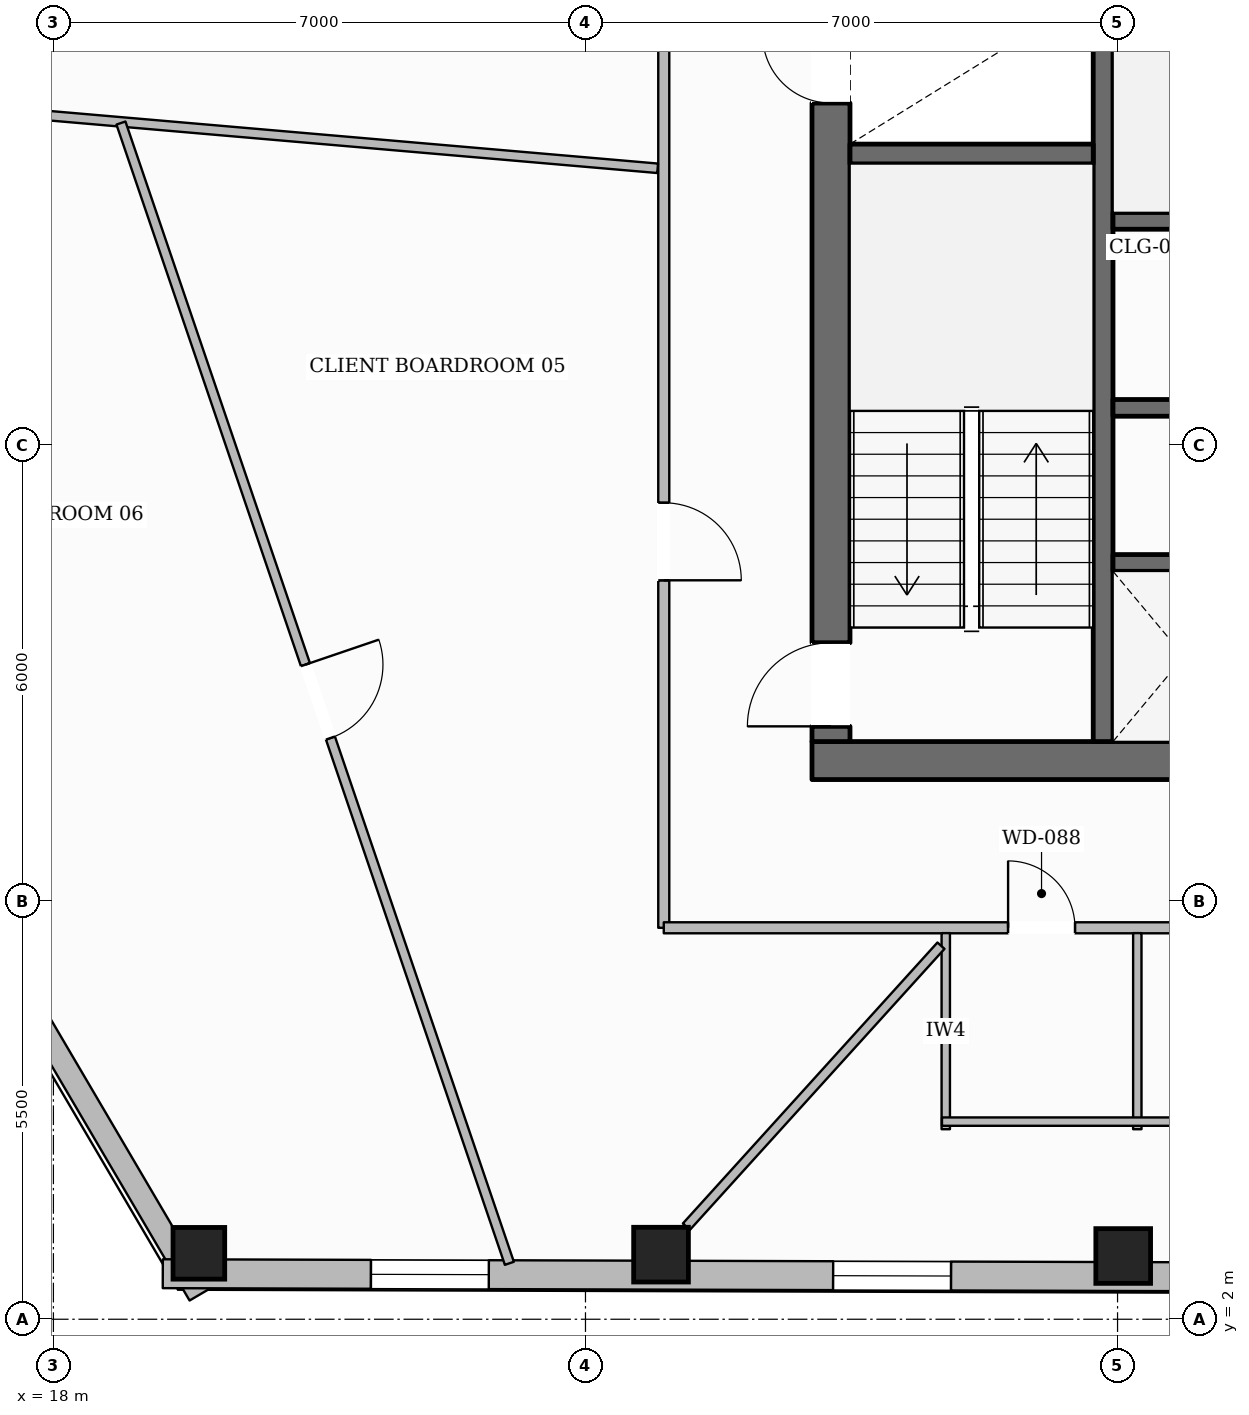
"""IFC4 building model, lengths in metres.
Left out: names, types, materials, properties, quantities, classifications, styles, units other than length and angle.
Written with IfcOpenShell. Run it as: python <this file> out.ifc"""

import sys

from ifc_helpers import new_model, si_unit, direction, frame, frame_2d, origin, origin_2d, place, context, subcontext, project, spatial, rectangle, hollow_rectangle, extrude, element, fill, save


model = new_model("IFC4")
c1 = context("Model", 3, precision=1e-05, world=origin(), true_north=direction((0.0, 1.0)))
c2 = subcontext(c1, "Body", "Model", "MODEL_VIEW")
j1 = project(units=[si_unit("LENGTHUNIT", "METRE"), si_unit("PLANEANGLEUNIT", "RADIAN")], contexts=[c1])
p1 = place(None, origin())
s1 = spatial("IfcSite", under=j1, at=p1, CompositionType="ELEMENT")
p2 = place(p1, origin())
s2 = spatial("IfcBuilding", under=s1, at=p2, CompositionType="ELEMENT")
p3 = place(p2, frame((0.0, 0.0, 127.85)))
s3 = spatial("IfcBuildingStorey", under=s2, at=p3, CompositionType="ELEMENT", Elevation=127.85)
p4 = place(p3, frame((27.98, 9.35, 0.0), z_axis=(0.0, 0.0, 1.0), x_axis=(1.0, 0.0, 0.0)))
e1 = element("IfcWall", 1, at=p4, inside=s3, PredefinedType="SOLIDWALL", context=c2, shape_type="SweptSolid", body=[
    extrude(rectangle(XDim=20.04, YDim=0.5, at=frame_2d((10.02, 0.0))), origin(), (0.0, 0.0, 1.0), 3.6),
])
p5 = place(p4, frame((10.52, 0.0, 0.0)))
e2 = element("IfcOpeningElement", 2, at=p5, cuts=e1, PredefinedType="OPENING", context=c2, shape_type="SweptSolid", body=[
    extrude(rectangle(XDim=1.4, YDim=2.2, at=frame_2d((0.7, 1.1))), frame((0.0, 0.26, 0.0), z_axis=(0.0, -1.0, 0.0), x_axis=(1.0, 0.0, 0.0)), (0.0, 0.0, 1.0), 0.52),
])
p6 = place(p3, frame((28.23, 9.6, 0.0), z_axis=(0.0, 0.0, 1.0), x_axis=(0.0, 1.0, 0.0)))
e3 = element("IfcWall", 3, at=p6, inside=s3, PredefinedType="SOLIDWALL", context=c2, shape_type="SweptSolid", body=[
    extrude(rectangle(XDim=13.0, YDim=0.5, at=frame_2d((6.5, 0.0))), origin(), (0.0, 0.0, 1.0), 3.6),
])
p7 = place(p6, frame((0.2, 0.0, 0.0)))
e4 = element("IfcOpeningElement", 4, at=p7, cuts=e3, PredefinedType="OPENING", context=c2, shape_type="SweptSolid", body=[
    extrude(rectangle(XDim=1.1, YDim=2.15, at=frame_2d((0.55, 1.075))), frame((0.0, 0.26, 0.0), z_axis=(0.0, -1.0, 0.0), x_axis=(1.0, 0.0, 0.0)), (0.0, 0.0, 1.0), 0.52),
])
p8 = place(p6, frame((8.4, 0.0, 0.0)))
e5 = element("IfcOpeningElement", 5, at=p8, cuts=e3, PredefinedType="OPENING", context=c2, shape_type="SweptSolid", body=[
    extrude(rectangle(XDim=0.9, YDim=2.1, at=frame_2d((0.45, 1.05))), frame((0.0, 0.26, 0.0), z_axis=(0.0, -1.0, 0.0), x_axis=(1.0, 0.0, 0.0)), (0.0, 0.0, 1.0), 0.52),
])
p9 = place(p3, frame((31.81, 9.6, 0.0), z_axis=(0.0, 0.0, 1.0), x_axis=(0.0, 1.0, 0.0)))
e6 = element("IfcWall", 6, at=p9, inside=s3, PredefinedType="SHEAR", context=c2, shape_type="SweptSolid", body=[
    extrude(rectangle(XDim=13.0, YDim=0.26, at=frame_2d((6.5, 0.0))), origin(), (0.0, 0.0, 1.0), 3.6),
])
p10 = place(p9, frame((10.925, 0.0, 0.0)))
e7 = element("IfcOpeningElement", 7, at=p10, cuts=e6, PredefinedType="OPENING", context=c2, shape_type="SweptSolid", body=[
    extrude(rectangle(XDim=1.25, YDim=2.25, at=frame_2d((0.625, 1.125))), frame((0.0, 0.14, 0.0), z_axis=(0.0, -1.0, 0.0), x_axis=(1.0, 0.0, 0.0)), (0.0, 0.0, 1.0), 0.28),
])
p11 = place(p3, frame((28.48, 17.33, 0.0), z_axis=(0.0, 0.0, 1.0), x_axis=(1.0, 0.0, 0.0)))
e8 = element("IfcWall", 8, at=p11, inside=s3, PredefinedType="SHEAR", context=c2, shape_type="SweptSolid", body=[
    extrude(rectangle(XDim=3.2, YDim=0.26, at=frame_2d((1.6, 0.0))), origin(), (0.0, 0.0, 1.0), 3.6),
])
p12 = place(p3, frame((31.94, 16.45, 0.0), z_axis=(0.0, 0.0, 1.0), x_axis=(1.0, 0.0, 0.0)))
e9 = element("IfcWall", 9, at=p12, inside=s3, PredefinedType="SOLIDWALL", context=c2, shape_type="SweptSolid", body=[
    extrude(rectangle(XDim=12.12, YDim=0.22, at=frame_2d((6.06, 0.0))), origin(), (0.0, 0.0, 1.0), 3.6),
])
p13 = place(p3, frame((31.94, 13.99, 0.0), z_axis=(0.0, 0.0, 1.0), x_axis=(1.0, 0.0, 0.0)))
e10 = element("IfcWall", 10, at=p13, inside=s3, PredefinedType="SOLIDWALL", context=c2, shape_type="SweptSolid", body=[
    extrude(rectangle(XDim=12.12, YDim=0.22, at=frame_2d((6.06, 0.0))), origin(), (0.0, 0.0, 1.0), 3.6),
])
p14 = place(p13, frame((2.51, 0.0, 0.0)))
e11 = element("IfcOpeningElement", 11, at=p14, cuts=e10, PredefinedType="OPENING", context=c2, shape_type="SweptSolid", body=[
    extrude(rectangle(XDim=0.9, YDim=2.1, at=frame_2d((0.45, 1.05))), frame((0.0, 0.12, 0.0), z_axis=(0.0, -1.0, 0.0), x_axis=(1.0, 0.0, 0.0)), (0.0, 0.0, 1.0), 0.24),
])
p15 = place(p13, frame((6.535, 0.0, 0.0)))
e12 = element("IfcOpeningElement", 12, at=p15, cuts=e10, PredefinedType="OPENING", context=c2, shape_type="SweptSolid", body=[
    extrude(rectangle(XDim=1.1, YDim=2.2, at=frame_2d((0.55, 1.1))), frame((0.0, 0.12, 0.0), z_axis=(0.0, -1.0, 0.0), x_axis=(1.0, 0.0, 0.0)), (0.0, 0.0, 1.0), 0.24),
])
p16 = place(p13, frame((8.585, 0.0, 0.0)))
e13 = element("IfcOpeningElement", 13, at=p16, cuts=e10, PredefinedType="OPENING", context=c2, shape_type="SweptSolid", body=[
    extrude(rectangle(XDim=1.1, YDim=2.2, at=frame_2d((0.55, 1.1))), frame((0.0, 0.12, 0.0), z_axis=(0.0, -1.0, 0.0), x_axis=(1.0, 0.0, 0.0)), (0.0, 0.0, 1.0), 0.24),
])
p17 = place(p13, frame((10.635, 0.0, 0.0)))
e14 = element("IfcOpeningElement", 14, at=p17, cuts=e10, PredefinedType="OPENING", context=c2, shape_type="SweptSolid", body=[
    extrude(rectangle(XDim=1.1, YDim=2.2, at=frame_2d((0.55, 1.1))), frame((0.0, 0.12, 0.0), z_axis=(0.0, -1.0, 0.0), x_axis=(1.0, 0.0, 0.0)), (0.0, 0.0, 1.0), 0.24),
])
p18 = place(p3, frame((31.94, 11.95, 0.0), z_axis=(0.0, 0.0, 1.0), x_axis=(1.0, 0.0, 0.0)))
e15 = element("IfcWall", 15, at=p18, inside=s3, PredefinedType="SOLIDWALL", context=c2, shape_type="SweptSolid", body=[
    extrude(rectangle(XDim=6.19, YDim=0.22, at=frame_2d((3.095, 0.0))), origin(), (0.0, 0.0, 1.0), 3.6),
])
p19 = place(p3, frame((19.914, 2.868, 0.0), z_axis=(0.0, 0.0, 1.0), x_axis=(1.0, 0.0, 0.0)))
e16 = element("IfcColumn", 16, at=p19, inside=s3, PredefinedType="COLUMN", context=c2, shape_type="SweptSolid", body=[
    extrude(hollow_rectangle(XDim=0.68, YDim=0.68, WallThickness=0.03, at=origin_2d()), origin(), (0.0, 0.0, 1.0), 3.6),
])
for number, where, z_axis, x_axis in (
    (17, (25.994, 2.85, 0.0), (0.0, 0.0, 1.0), (1.0, 0.0, 0.0)),
    (18, (32.074, 2.832, 0.0), (0.0, 0.0, 1.0), (1.0, 0.0, 0.0)),
):
    element("IfcColumn", number, at=place(p3, frame(where, z_axis=z_axis, x_axis=x_axis)), inside=s3, PredefinedType="COLUMN", context=c2, shape_type="SweptSolid", body=[
        extrude(hollow_rectangle(XDim=0.72, YDim=0.72, WallThickness=0.032, at=origin_2d()), origin(), (0.0, 0.0, 1.0), 3.6),
    ])
p20 = place(p3, frame((13.648, 12.443, 0.0), z_axis=(0.0, 0.0, 1.0), x_axis=(0.504070270963, 0.863662643589, 0.0)))
e19 = element("IfcWall", 19, at=p20, inside=s3, PredefinedType="STANDARD", context=c2, shape_type="SweptSolid", body=[
    extrude(rectangle(XDim=36.948, YDim=0.38, at=frame_2d((18.474, 0.0))), origin(), (0.0, 0.0, 1.0), 3.059),
])
p21 = place(p20, frame((27.111, 0.0, 0.0)))
e20 = element("IfcOpeningElement", 20, at=p21, cuts=e19, PredefinedType="OPENING", context=c2, shape_type="SweptSolid", body=[
    extrude(rectangle(XDim=1.0, YDim=2.2, at=frame_2d((0.5, 1.1))), frame((0.0, 0.2, 0.0), z_axis=(0.0, -1.0, 0.0), x_axis=(1.0, 0.0, 0.0)), (0.0, 0.0, 1.0), 0.4),
])
p22 = place(p20, frame((32.697, 0.0, 0.65)))
e21 = element("IfcOpeningElement", 21, at=p22, cuts=e19, PredefinedType="OPENING", context=c2, shape_type="SweptSolid", body=[
    extrude(rectangle(XDim=1.55, YDim=1.75, at=frame_2d((0.775, 0.875))), frame((0.0, 0.2, 0.0), z_axis=(0.0, -1.0, 0.0), x_axis=(1.0, 0.0, 0.0)), (0.0, 0.0, 1.0), 0.4),
])
p23 = place(p20, frame((20.7, 0.0, 0.65)))
e22 = element("IfcOpeningElement", 22, at=p23, cuts=e19, PredefinedType="OPENING", context=c2, shape_type="SweptSolid", body=[
    extrude(rectangle(XDim=1.55, YDim=1.75, at=frame_2d((0.775, 0.875))), frame((0.0, 0.2, 0.0), z_axis=(0.0, -1.0, 0.0), x_axis=(1.0, 0.0, 0.0)), (0.0, 0.0, 1.0), 0.4),
])
p24 = place(p20, frame((8.704, 0.0, 0.65)))
e23 = element("IfcOpeningElement", 23, at=p24, cuts=e19, PredefinedType="OPENING", context=c2, shape_type="SweptSolid", body=[
    extrude(rectangle(XDim=1.55, YDim=1.75, at=frame_2d((0.775, 0.875))), frame((0.0, 0.2, 0.0), z_axis=(0.0, -1.0, 0.0), x_axis=(1.0, 0.0, 0.0)), (0.0, 0.0, 1.0), 0.4),
])
p25 = place(p20, frame((2.705, 0.0, 0.65)))
e24 = element("IfcOpeningElement", 24, at=p25, cuts=e19, PredefinedType="OPENING", context=c2, shape_type="SweptSolid", body=[
    extrude(rectangle(XDim=1.55, YDim=1.75, at=frame_2d((0.775, 0.875))), frame((0.0, 0.2, 0.0), z_axis=(0.0, -1.0, 0.0), x_axis=(1.0, 0.0, 0.0)), (0.0, 0.0, 1.0), 0.4),
])
p26 = place(p3, frame((19.921, 2.322, 0.0), z_axis=(0.0, 0.0, 1.0), x_axis=(-0.506600522331, 0.86218090374, 0.0)))
e25 = element("IfcWall", 25, at=p26, inside=s3, PredefinedType="STANDARD", context=c2, shape_type="SweptSolid", body=[
    extrude(rectangle(XDim=12.385, YDim=0.3, at=frame_2d((6.192, 0.0))), origin(), (0.0, 0.0, 1.0), 3.059),
])
p27 = place(p26, frame((5.592, 0.0, 0.65)))
e26 = element("IfcOpeningElement", 26, at=p27, cuts=e25, PredefinedType="OPENING", context=c2, shape_type="SweptSolid", body=[
    extrude(rectangle(XDim=1.2, YDim=1.7, at=frame_2d((0.6, 0.85))), frame((0.0, 0.16, 0.0), z_axis=(0.0, -1.0, 0.0), x_axis=(1.0, 0.0, 0.0)), (0.0, 0.0, 1.0), 0.32),
])
p28 = place(p3, frame((56.872, 2.49, 0.0), z_axis=(0.0, 0.0, 1.0), x_axis=(-0.999995712094, 0.002928445665, 0.0)))
e27 = element("IfcWall", 27, at=p28, inside=s3, PredefinedType="STANDARD", context=c2, shape_type="SweptSolid", body=[
    extrude(rectangle(XDim=37.433, YDim=0.38, at=frame_2d((18.716, 0.0))), origin(), (0.0, 0.0, 1.0), 3.059),
])
p29 = place(p28, frame((33.144, 0.0, 0.65)))
e28 = element("IfcOpeningElement", 28, at=p29, cuts=e27, PredefinedType="OPENING", context=c2, shape_type="SweptSolid", body=[
    extrude(rectangle(XDim=1.55, YDim=1.75, at=frame_2d((0.775, 0.875))), frame((0.0, 0.2, 0.0), z_axis=(0.0, -1.0, 0.0), x_axis=(1.0, 0.0, 0.0)), (0.0, 0.0, 1.0), 0.4),
])
p30 = place(p28, frame((27.063, 0.0, 0.65)))
e29 = element("IfcOpeningElement", 29, at=p30, cuts=e27, PredefinedType="OPENING", context=c2, shape_type="SweptSolid", body=[
    extrude(rectangle(XDim=1.55, YDim=1.75, at=frame_2d((0.775, 0.875))), frame((0.0, 0.2, 0.0), z_axis=(0.0, -1.0, 0.0), x_axis=(1.0, 0.0, 0.0)), (0.0, 0.0, 1.0), 0.4),
])
p31 = place(p28, frame((20.983, 0.0, 0.65)))
e30 = element("IfcOpeningElement", 30, at=p31, cuts=e27, PredefinedType="OPENING", context=c2, shape_type="SweptSolid", body=[
    extrude(rectangle(XDim=1.55, YDim=1.75, at=frame_2d((0.775, 0.875))), frame((0.0, 0.2, 0.0), z_axis=(0.0, -1.0, 0.0), x_axis=(1.0, 0.0, 0.0)), (0.0, 0.0, 1.0), 0.4),
])
p32 = place(p28, frame((8.822, 0.0, 0.65)))
e31 = element("IfcOpeningElement", 31, at=p32, cuts=e27, PredefinedType="OPENING", context=c2, shape_type="SweptSolid", body=[
    extrude(rectangle(XDim=1.55, YDim=1.75, at=frame_2d((0.775, 0.875))), frame((0.0, 0.2, 0.0), z_axis=(0.0, -1.0, 0.0), x_axis=(1.0, 0.0, 0.0)), (0.0, 0.0, 1.0), 0.4),
])
p33 = place(p28, frame((2.742, 0.0, 0.65)))
e32 = element("IfcOpeningElement", 32, at=p33, cuts=e27, PredefinedType="OPENING", context=c2, shape_type="SweptSolid", body=[
    extrude(rectangle(XDim=1.55, YDim=1.75, at=frame_2d((0.775, 0.875))), frame((0.0, 0.2, 0.0), z_axis=(0.0, -1.0, 0.0), x_axis=(1.0, 0.0, 0.0)), (0.0, 0.0, 1.0), 0.4),
])
p34 = place(p3, frame((26.03, 25.05, 0.0), z_axis=(0.0, 0.0, 1.0), x_axis=(0.0, -1.0, 0.0)))
e33 = element("IfcWall", 33, at=p34, inside=s3, PredefinedType="PARTITIONING", context=c2, shape_type="SweptSolid", body=[
    extrude(rectangle(XDim=17.9, YDim=0.145, at=frame_2d((8.95, 0.0))), origin(), (0.0, 0.0, 1.0), 3.288),
])
p35 = place(p34, frame((3.53, 0.0, 0.0)))
e34 = element("IfcOpeningElement", 34, at=p35, cuts=e33, PredefinedType="OPENING", context=c2, shape_type="SweptSolid", body=[
    extrude(rectangle(XDim=1.02, YDim=2.15, at=frame_2d((0.51, 1.075))), frame((0.0, 0.083, 0.0), z_axis=(0.0, -1.0, 0.0), x_axis=(1.0, 0.0, 0.0)), (0.0, 0.0, 1.0), 0.165),
])
p36 = place(p34, frame((12.309, 0.0, 0.0)))
e35 = element("IfcOpeningElement", 35, at=p36, cuts=e33, PredefinedType="OPENING", context=c2, shape_type="SweptSolid", body=[
    extrude(rectangle(XDim=1.02, YDim=2.15, at=frame_2d((0.51, 1.075))), frame((0.0, 0.083, 0.0), z_axis=(0.0, -1.0, 0.0), x_axis=(1.0, 0.0, 0.0)), (0.0, 0.0, 1.0), 0.165),
])
p37 = place(p3, frame((26.03, 7.15, 0.0), z_axis=(0.0, 0.0, 1.0), x_axis=(1.0, 0.0, 0.0)))
e36 = element("IfcWall", 36, at=p37, inside=s3, PredefinedType="PARTITIONING", context=c2, shape_type="SweptSolid", body=[
    extrude(rectangle(XDim=23.94, YDim=0.145, at=frame_2d((11.97, 0.0))), origin(), (0.0, 0.0, 1.0), 3.6),
])
p38 = place(p37, frame((4.53, 0.0, 0.0)))
e37 = element("IfcOpeningElement", 37, at=p38, cuts=e36, PredefinedType="OPENING", context=c2, shape_type="SweptSolid", body=[
    extrude(rectangle(XDim=0.88, YDim=2.1, at=frame_2d((0.44, 1.05))), frame((0.0, 0.083, 0.0), z_axis=(0.0, -1.0, 0.0), x_axis=(1.0, 0.0, 0.0)), (0.0, 0.0, 1.0), 0.165),
])
p39 = place(p37, frame((7.05, 0.0, 0.0)))
e38 = element("IfcOpeningElement", 38, at=p39, cuts=e36, PredefinedType="OPENING", context=c2, shape_type="SweptSolid", body=[
    extrude(rectangle(XDim=0.88, YDim=2.1, at=frame_2d((0.44, 1.05))), frame((0.0, 0.083, 0.0), z_axis=(0.0, -1.0, 0.0), x_axis=(1.0, 0.0, 0.0)), (0.0, 0.0, 1.0), 0.165),
])
p40 = place(p37, frame((9.43, 0.0, 0.0)))
e39 = element("IfcOpeningElement", 39, at=p40, cuts=e36, PredefinedType="OPENING", context=c2, shape_type="SweptSolid", body=[
    extrude(rectangle(XDim=0.96, YDim=2.1, at=frame_2d((0.48, 1.05))), frame((0.0, 0.083, 0.0), z_axis=(0.0, -1.0, 0.0), x_axis=(1.0, 0.0, 0.0)), (0.0, 0.0, 1.0), 0.165),
])
for number, where, z_axis, x_axis in (
    (40, (29.74, 4.5, 0.0), (0.0, 0.0, 1.0), (0.0, 1.0, 0.0)),
    (41, (32.26, 4.5, 0.0), (0.0, 0.0, 1.0), (0.0, 1.0, 0.0)),
):
    element("IfcWall", number, at=place(p3, frame(where, z_axis=z_axis, x_axis=x_axis)), inside=s3, PredefinedType="PLUMBINGWALL", context=c2, shape_type="SweptSolid", body=[
        extrude(rectangle(XDim=2.58, YDim=0.11, at=frame_2d((1.29, 0.0))), origin(), (0.0, 0.0, 1.0), 3.6),
    ])
p41 = place(p3, frame((29.69, 4.6, 0.0), z_axis=(0.0, 0.0, 1.0), x_axis=(1.0, 0.0, 0.0)))
e42 = element("IfcWall", 42, at=p41, inside=s3, PredefinedType="PLUMBINGWALL", context=c2, shape_type="SweptSolid", body=[
    extrude(rectangle(XDim=7.46, YDim=0.11, at=frame_2d((3.73, 0.0))), origin(), (0.0, 0.0, 1.0), 3.6),
])
p42 = place(p3, frame((25.949, 17.142, 0.0), z_axis=(0.0, 0.0, 1.0), x_axis=(-0.996283209421, 0.086138067226, 0.0)))
e43 = element("IfcWall", 43, at=p42, inside=s3, PredefinedType="PARTITIONING", context=c2, shape_type="SweptSolid", body=[
    extrude(rectangle(XDim=8.466, YDim=0.125, at=frame_2d((4.233, 0.0))), origin(), (0.0, 0.0, 1.0), 3.141),
])
p43 = place(p3, frame((29.677, 6.915, 0.0), z_axis=(0.0, 0.0, 1.0), x_axis=(-0.671453924144, -0.741046306078, 0.0)))
e44 = element("IfcWall", 44, at=p43, inside=s3, PredefinedType="PARTITIONING", context=c2, shape_type="SweptSolid", body=[
    extrude(rectangle(XDim=4.989, YDim=0.125, at=frame_2d((2.494, 0.0))), origin(), (0.0, 0.0, 1.0), 3.6),
])
p44 = place(p3, frame((18.889, 17.737, 0.0), z_axis=(0.0, 0.0, 1.0), x_axis=(0.322427692705, -0.946594096209, 0.0)))
e45 = element("IfcWall", 45, at=p44, inside=s3, PredefinedType="PARTITIONING", context=c2, shape_type="SweptSolid", body=[
    extrude(rectangle(XDim=15.848, YDim=0.125, at=frame_2d((7.924, 0.0))), origin(), (0.0, 0.0, 1.0), 3.6),
])
p45 = place(p44, frame((7.528, 0.0, 0.0)))
e46 = element("IfcOpeningElement", 46, at=p45, cuts=e45, PredefinedType="OPENING", context=c2, shape_type="SweptSolid", body=[
    extrude(rectangle(XDim=1.02, YDim=2.15, at=frame_2d((0.51, 1.075))), frame((0.0, 0.073, 0.0), z_axis=(0.0, -1.0, 0.0), x_axis=(1.0, 0.0, 0.0)), (0.0, 0.0, 1.0), 0.145),
])
p46 = place(p29, origin())
e47 = element("IfcWindow", 47, at=p46, inside=s3, PartitioningType="SINGLE_PANEL", PredefinedType="WINDOW", context=c2, shape_type="SweptSolid", body=[
    extrude(rectangle(XDim=1.55, YDim=1.75, at=frame_2d((0.775, 0.875))), frame((0.0, 0.03, 0.0), z_axis=(0.0, -1.0, 0.0), x_axis=(1.0, 0.0, 0.0)), (0.0, 0.0, 1.0), 0.06),
])
fill(e28, e47)
p47 = place(p30, origin())
e48 = element("IfcWindow", 48, at=p47, inside=s3, PartitioningType="SINGLE_PANEL", PredefinedType="WINDOW", context=c2, shape_type="SweptSolid", body=[
    extrude(rectangle(XDim=1.55, YDim=1.75, at=frame_2d((0.775, 0.875))), frame((0.0, 0.03, 0.0), z_axis=(0.0, -1.0, 0.0), x_axis=(1.0, 0.0, 0.0)), (0.0, 0.0, 1.0), 0.06),
])
fill(e29, e48)
p48 = place(p7, origin())
e49 = element("IfcDoor", 49, at=p48, inside=s3, OperationType="SINGLE_SWING_LEFT", PredefinedType="DOOR", context=c2, shape_type="SweptSolid", body=[
    extrude(rectangle(XDim=1.1, YDim=2.15, at=frame_2d((0.55, 1.075))), frame((0.0, 0.025, 0.0), z_axis=(0.0, -1.0, 0.0), x_axis=(1.0, 0.0, 0.0)), (0.0, 0.0, 1.0), 0.05),
])
fill(e4, e49)
p49 = place(p8, origin())
e50 = element("IfcDoor", 50, at=p49, inside=s3, OperationType="SINGLE_SWING_RIGHT", PredefinedType="DOOR", context=c2, shape_type="SweptSolid", body=[
    extrude(rectangle(XDim=0.9, YDim=2.1, at=frame_2d((0.45, 1.05))), frame((0.0, 0.025, 0.0), z_axis=(0.0, -1.0, 0.0), x_axis=(1.0, 0.0, 0.0)), (0.0, 0.0, 1.0), 0.05),
])
fill(e5, e50)
p50 = place(p38, origin())
e51 = element("IfcDoor", 51, at=p50, inside=s3, OperationType="SINGLE_SWING_LEFT", PredefinedType="DOOR", context=c2, shape_type="SweptSolid", body=[
    extrude(rectangle(XDim=0.88, YDim=2.1, at=frame_2d((0.44, 1.05))), frame((0.0, 0.025, 0.0), z_axis=(0.0, -1.0, 0.0), x_axis=(1.0, 0.0, 0.0)), (0.0, 0.0, 1.0), 0.05),
])
fill(e37, e51)
p51 = place(p36, origin())
e52 = element("IfcDoor", 52, at=p51, inside=s3, OperationType="SINGLE_SWING_RIGHT", PredefinedType="DOOR", context=c2, shape_type="SweptSolid", body=[
    extrude(rectangle(XDim=1.02, YDim=2.15, at=frame_2d((0.51, 1.075))), frame((0.0, 0.025, 0.0), z_axis=(0.0, -1.0, 0.0), x_axis=(1.0, 0.0, 0.0)), (0.0, 0.0, 1.0), 0.05),
])
fill(e35, e52)
p52 = place(p45, origin())
e53 = element("IfcDoor", 53, at=p52, inside=s3, OperationType="SINGLE_SWING_LEFT", PredefinedType="DOOR", context=c2, shape_type="SweptSolid", body=[
    extrude(rectangle(XDim=1.02, YDim=2.15, at=frame_2d((0.51, 1.075))), frame((0.0, 0.025, 0.0), z_axis=(0.0, -1.0, 0.0), x_axis=(1.0, 0.0, 0.0)), (0.0, 0.0, 1.0), 0.05),
])
fill(e46, e53)
save(model, sys.argv[1])
